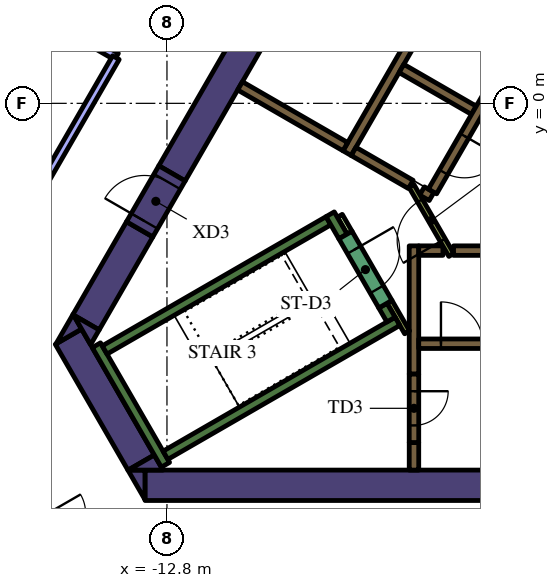
"""IFC4 building model, lengths in metres.
Left out: names, types, materials, properties, quantities, classifications, styles, units other than length and angle.
Written with IfcOpenShell. Run it as: python <this file> out.ifc"""

import sys

from ifc_helpers import new_model, si_unit, direction, frame, frame_2d, origin, place, context, subcontext, project, spatial, polyline, rectangle, outline, extrude, element, fill, save


model = new_model("IFC4")
c1 = context("Model", 3, precision=1e-05, world=origin(), true_north=direction((0.0, 1.0)))
c2 = subcontext(c1, "Body", "Model", "MODEL_VIEW")
j1 = project(units=[si_unit("LENGTHUNIT", "METRE"), si_unit("PLANEANGLEUNIT", "RADIAN")], contexts=[c1])
p1 = place(None, origin())
s1 = spatial("IfcSite", under=j1, at=p1, CompositionType="ELEMENT")
p2 = place(p1, origin())
s2 = spatial("IfcBuilding", under=s1, at=p2, CompositionType="ELEMENT")
p3 = place(p2, frame((0.0, 0.0, 192.0)))
s3 = spatial("IfcBuildingStorey", under=s2, at=p3, CompositionType="ELEMENT", Elevation=192.0)
p4 = place(p3, frame((-13.378, -10.05, 0.0), z_axis=(0.0, 0.0, 1.0), x_axis=(1.0, 0.0, 0.0)))
e1 = element("IfcWall", 1, at=p4, inside=s3, PredefinedType="SOLIDWALL", context=c2, shape_type="SweptSolid", body=[
    extrude(rectangle(XDim=22.282, YDim=0.8, at=frame_2d((11.141, 0.0))), origin(), (0.0, 0.0, 1.0), 4.2),
])
p5 = place(p3, origin())
e2 = element("IfcWall", 2, at=p5, inside=s3, PredefinedType="SOLIDWALL", context=c2, shape_type="SweptSolid", body=[
    extrude(outline(polyline([(-13.828, -9.65), (-13.38, -9.65), (-13.38, -10.426), (-13.828, -9.65)])), origin(), (0.0, 0.0, 1.0), 4.2),
])
p6 = place(p3, frame((-15.392, -6.14, 0.0), z_axis=(0.0, 0.0, 1.0), x_axis=(0.499984020225, -0.866034629516, 0.0)))
e3 = element("IfcWall", 3, at=p6, inside=s3, PredefinedType="SOLIDWALL", context=c2, shape_type="SweptSolid", body=[
    extrude(rectangle(XDim=3.824, YDim=0.8, at=frame_2d((1.912, 0.0))), origin(), (0.0, 0.0, 1.0), 4.2),
])
e4 = element("IfcWall", 4, at=p5, inside=s3, PredefinedType="SOLIDWALL", context=c2, shape_type="SweptSolid", body=[
    extrude(outline(polyline([(-15.047, -5.938), (-15.719, -6.326), (-15.271, -5.55), (-15.047, -5.938)])), origin(), (0.0, 0.0, 1.0), 4.2),
])
e5 = element("IfcWall", 5, at=p5, inside=s3, PredefinedType="SOLIDWALL", context=c2, shape_type="SweptSolid", body=[
    extrude(outline(polyline([(-12.904, -9.65), (-13.82, -9.65), (-13.133, -9.253), (-12.904, -9.65)])), origin(), (0.0, 0.0, 1.0), 4.2),
])
p7 = place(p3, frame((-13.518, -3.314, 0.0), z_axis=(0.0, 0.0, 1.0), x_axis=(-0.499969377405, -0.866043083026, 0.0)))
e6 = element("IfcWall", 6, at=p7, inside=s3, PredefinedType="SOLIDWALL", context=c2, shape_type="SweptSolid", body=[
    extrude(rectangle(XDim=2.824, YDim=0.8, at=frame_2d((1.412, 0.0))), origin(), (0.0, 0.0, 1.0), 4.2),
])
e7 = element("IfcWall", 7, at=p5, inside=s3, PredefinedType="SOLIDWALL", context=c2, shape_type="SweptSolid", body=[
    extrude(outline(polyline([(-14.809, -6.35), (-15.257, -5.574), (-14.585, -5.962), (-14.809, -6.35)])), origin(), (0.0, 0.0, 1.0), 4.2),
])
p8 = place(p3, frame((-4.321, 12.616, 0.0), z_axis=(0.0, 0.0, 1.0), x_axis=(-0.500009809857, -0.866019739987, 0.0)))
e8 = element("IfcWall", 8, at=p8, inside=s3, PredefinedType="SOLIDWALL", context=c2, shape_type="SweptSolid", body=[
    extrude(rectangle(XDim=16.695, YDim=0.8, at=frame_2d((8.347, 0.0))), origin(), (0.0, 0.0, 1.0), 4.2),
])
p9 = place(p3, frame((-12.84, -9.511, 0.0), z_axis=(0.0, 0.0, 1.0), x_axis=(-0.499997733992, 0.866026712061, 0.0)))
e9 = element("IfcWall", 9, at=p9, inside=s3, PredefinedType="SOLIDWALL", context=c2, shape_type="SweptSolid", body=[
    extrude(rectangle(XDim=3.634, YDim=0.25, at=frame_2d((1.817, 0.0))), origin(), (0.0, 0.0, 1.0), 4.2),
])
p10 = place(p3, frame((-14.44, -6.49, 0.0), z_axis=(0.0, 0.0, 1.0), x_axis=(0.866022966069, 0.500004222222, 0.0)))
e10 = element("IfcWall", 10, at=p10, inside=s3, PredefinedType="SOLIDWALL", context=c2, shape_type="SweptSolid", body=[
    extrude(rectangle(XDim=6.8, YDim=0.25, at=frame_2d((3.4, 0.0))), origin(), (0.0, 0.0, 1.0), 4.2),
])
p11 = place(p3, frame((-8.168, -3.503, 0.0), z_axis=(0.0, 0.0, 1.0), x_axis=(-0.499952099219, 0.866053057547, 0.0)))
e11 = element("IfcWall", 11, at=p11, inside=s3, PredefinedType="SOLIDWALL", context=c2, shape_type="SweptSolid", body=[
    extrude(rectangle(XDim=0.675, YDim=0.25, at=frame_2d((0.337, 0.0))), origin(), (0.0, 0.0, 1.0), 4.2),
])
p12 = place(p3, frame((-12.84, -9.261, 0.0), z_axis=(0.0, 0.0, 1.0), x_axis=(0.866016039709, 0.500016218704, 0.0)))
e12 = element("IfcWall", 12, at=p12, inside=s3, PredefinedType="SOLIDWALL", context=c2, shape_type="SweptSolid", body=[
    extrude(rectangle(XDim=7.05, YDim=0.25, at=frame_2d((3.525, 0.0))), origin(), (0.0, 0.0, 1.0), 4.2),
])
p13 = place(p3, frame((-6.905, -5.69, 0.0), z_axis=(0.0, 0.0, 1.0), x_axis=(-0.500402024738, 0.865793170242, 0.0)))
e13 = element("IfcWall", 13, at=p13, inside=s3, PredefinedType="SOLIDWALL", context=c2, shape_type="SweptSolid", body=[
    extrude(rectangle(XDim=0.425, YDim=0.25, at=frame_2d((0.212, 0.0))), origin(), (0.0, 0.0, 1.0), 4.2),
])
p14 = place(p3, frame((-6.3, -8.925, 0.0), z_axis=(0.0, 0.0, 1.0), x_axis=(0.0, -1.0, 0.0)))
e14 = element("IfcWall", 14, at=p14, inside=s3, PredefinedType="SOLIDWALL", context=c2, shape_type="SweptSolid", body=[
    extrude(rectangle(XDim=0.725, YDim=0.25, at=frame_2d((0.363, 0.0))), origin(), (0.0, 0.0, 1.0), 4.2),
])
p15 = place(p3, frame((-5.259, -3.875, 0.0), z_axis=(0.0, 0.0, 1.0), x_axis=(1.0, 0.0, 0.0)))
e15 = element("IfcWall", 15, at=p15, inside=s3, PredefinedType="SOLIDWALL", context=c2, shape_type="SweptSolid", body=[
    extrude(rectangle(XDim=10.489, YDim=0.25, at=frame_2d((5.244, 0.0))), origin(), (0.0, 0.0, 1.0), 4.2),
])
p16 = place(p3, frame((-6.3, -7.125, 0.0), z_axis=(0.0, 0.0, 1.0), x_axis=(0.0, 1.0, 0.0)))
e16 = element("IfcWall", 16, at=p16, inside=s3, PredefinedType="SOLIDWALL", context=c2, shape_type="SweptSolid", body=[
    extrude(rectangle(XDim=3.375, YDim=0.25, at=frame_2d((1.687, 0.0))), origin(), (0.0, 0.0, 1.0), 4.2),
])
p17 = place(p3, frame((-6.175, -3.875, 0.0), z_axis=(0.0, 0.0, 1.0), x_axis=(1.0, 0.0, 0.0)))
e17 = element("IfcWall", 17, at=p17, inside=s3, PredefinedType="SOLIDWALL", context=c2, shape_type="SweptSolid", body=[
    extrude(rectangle(XDim=0.637, YDim=0.25, at=frame_2d((0.318, 0.0))), origin(), (0.0, 0.0, 1.0), 4.2),
])
p18 = place(p3, frame((-3.02, 7.419, 0.0), z_axis=(0.0, 0.0, 1.0), x_axis=(-0.500022956343, -0.866012149528, 0.0)))
e18 = element("IfcWall", 18, at=p18, inside=s3, PredefinedType="SOLIDWALL", context=c2, shape_type="SweptSolid", body=[
    extrude(rectangle(XDim=10.08, YDim=0.25, at=frame_2d((5.04, 0.0))), origin(), (0.0, 0.0, 1.0), 4.2),
])
p19 = place(p3, frame((-4.724, -0.182, 0.0), z_axis=(0.0, 0.0, 1.0), x_axis=(-0.866008176907, 0.50002983664, 0.0)))
e19 = element("IfcWall", 19, at=p19, inside=s3, PredefinedType="SOLIDWALL", context=c2, shape_type="SweptSolid", body=[
    extrude(rectangle(XDim=2.2, YDim=0.25, at=frame_2d((1.1, 0.0))), origin(), (0.0, 0.0, 1.0), 4.2),
])
p20 = place(p3, frame((-6.088, -2.305, 0.0), z_axis=(0.0, 0.0, 1.0), x_axis=(0.866059450854, -0.499941024108, 0.0)))
e20 = element("IfcWall", 20, at=p20, inside=s3, PredefinedType="SOLIDWALL", context=c2, shape_type="SweptSolid", body=[
    extrude(rectangle(XDim=0.29, YDim=0.25, at=frame_2d((0.145, 0.0))), origin(), (0.0, 0.0, 1.0), 4.2),
])
p21 = place(p3, frame((-7.889, -1.265, 0.0), z_axis=(0.0, 0.0, 1.0), x_axis=(0.865986741702, -0.500066958712, 0.0)))
e21 = element("IfcWall", 21, at=p21, inside=s3, PredefinedType="SOLIDWALL", context=c2, shape_type="SweptSolid", body=[
    extrude(rectangle(XDim=1.738, YDim=0.25, at=frame_2d((0.869, 0.0))), origin(), (0.0, 0.0, 1.0), 4.2),
])
p22 = place(p3, frame((-8.106, -1.14, 0.0), z_axis=(0.0, 0.0, 1.0), x_axis=(-0.866008981251, 0.500028443584, 0.0)))
e22 = element("IfcWall", 22, at=p22, inside=s3, PredefinedType="SOLIDWALL", context=c2, shape_type="SweptSolid", body=[
    extrude(rectangle(XDim=3.2, YDim=0.25, at=frame_2d((1.6, 0.0))), origin(), (0.0, 0.0, 1.0), 4.2),
])
p23 = place(p3, frame((-8.252, -2.958, 0.0), z_axis=(0.0, 0.0, 1.0), x_axis=(0.500174715838, -0.865924508047, 0.0)))
e23 = element("IfcWall", 23, at=p23, inside=s3, PredefinedType="PARTITIONING", context=c2, shape_type="SweptSolid", body=[
    extrude(rectangle(XDim=0.514, YDim=0.15, at=frame_2d((0.257, 0.0))), origin(), (0.0, 0.0, 1.0), 3.1),
])
p24 = place(p3, frame((-6.48, -6.027, 0.0), z_axis=(0.0, 0.0, 1.0), x_axis=(-0.499927229454, 0.866067413802, 0.0)))
e24 = element("IfcWall", 24, at=p24, inside=s3, PredefinedType="PARTITIONING", context=c2, shape_type="SweptSolid", body=[
    extrude(rectangle(XDim=0.929, YDim=0.15, at=frame_2d((0.464, 0.0))), origin(), (0.0, 0.0, 1.0), 4.2),
])
p25 = place(p3, frame((-6.175, -6.325, 0.0), z_axis=(0.0, 0.0, 1.0), x_axis=(1.0, 0.0, 0.0)))
e25 = element("IfcWall", 25, at=p25, inside=s3, PredefinedType="SOLIDWALL", context=c2, shape_type="SweptSolid", body=[
    extrude(rectangle(XDim=12.35, YDim=0.25, at=frame_2d((6.175, 0.0))), origin(), (0.0, 0.0, 1.0), 4.2),
])
p26 = place(p25, frame((0.585, 0.0, 0.0)))
e26 = element("IfcOpeningElement", 26, at=p26, cuts=e25, PredefinedType="OPENING", context=c2, shape_type="SweptSolid", body=[
    extrude(rectangle(XDim=1.1, YDim=2.1, at=frame_2d((0.55, 1.05))), frame((0.0, 0.135, 0.0), z_axis=(0.0, -1.0, 0.0), x_axis=(1.0, 0.0, 0.0)), (0.0, 0.0, 1.0), 0.27),
])
p27 = place(p25, frame((3.105, 0.0, 0.0)))
e27 = element("IfcOpeningElement", 27, at=p27, cuts=e25, PredefinedType="OPENING", context=c2, shape_type="SweptSolid", body=[
    extrude(rectangle(XDim=1.1, YDim=2.1, at=frame_2d((0.55, 1.05))), frame((0.0, 0.135, 0.0), z_axis=(0.0, -1.0, 0.0), x_axis=(1.0, 0.0, 0.0)), (0.0, 0.0, 1.0), 0.27),
])
p28 = place(p25, frame((5.625, 0.0, 0.0)))
e28 = element("IfcOpeningElement", 28, at=p28, cuts=e25, PredefinedType="OPENING", context=c2, shape_type="SweptSolid", body=[
    extrude(rectangle(XDim=1.1, YDim=2.1, at=frame_2d((0.55, 1.05))), frame((0.0, 0.135, 0.0), z_axis=(0.0, -1.0, 0.0), x_axis=(1.0, 0.0, 0.0)), (0.0, 0.0, 1.0), 0.27),
])
p29 = place(p25, frame((8.145, 0.0, 0.0)))
e29 = element("IfcOpeningElement", 29, at=p29, cuts=e25, PredefinedType="OPENING", context=c2, shape_type="SweptSolid", body=[
    extrude(rectangle(XDim=1.1, YDim=2.1, at=frame_2d((0.55, 1.05))), frame((0.0, 0.135, 0.0), z_axis=(0.0, -1.0, 0.0), x_axis=(1.0, 0.0, 0.0)), (0.0, 0.0, 1.0), 0.27),
])
p30 = place(p25, frame((10.665, 0.0, 0.0)))
e30 = element("IfcOpeningElement", 30, at=p30, cuts=e25, PredefinedType="OPENING", context=c2, shape_type="SweptSolid", body=[
    extrude(rectangle(XDim=1.1, YDim=2.1, at=frame_2d((0.55, 1.05))), frame((0.0, 0.135, 0.0), z_axis=(0.0, -1.0, 0.0), x_axis=(1.0, 0.0, 0.0)), (0.0, 0.0, 1.0), 0.27),
])
p31 = place(p3, frame((-0.898, 6.194, 0.0), z_axis=(0.0, 0.0, 1.0), x_axis=(-0.499996202215, -0.866027596426, 0.0)))
e31 = element("IfcWall", 31, at=p31, inside=s3, PredefinedType="SOLIDWALL", context=c2, shape_type="SweptSolid", body=[
    extrude(rectangle(XDim=9.83, YDim=0.25, at=frame_2d((4.915, 0.0))), origin(), (0.0, 0.0, 1.0), 4.2),
])
p32 = place(p31, frame((0.585, 0.0, 0.0)))
e32 = element("IfcOpeningElement", 32, at=p32, cuts=e31, PredefinedType="OPENING", context=c2, shape_type="SweptSolid", body=[
    extrude(rectangle(XDim=1.1, YDim=2.1, at=frame_2d((0.55, 1.05))), frame((0.0, 0.135, 0.0), z_axis=(0.0, -1.0, 0.0), x_axis=(1.0, 0.0, 0.0)), (0.0, 0.0, 1.0), 0.27),
])
p33 = place(p31, frame((3.105, 0.0, 0.0)))
e33 = element("IfcOpeningElement", 33, at=p33, cuts=e31, PredefinedType="OPENING", context=c2, shape_type="SweptSolid", body=[
    extrude(rectangle(XDim=1.1, YDim=2.1, at=frame_2d((0.55, 1.05))), frame((0.0, 0.135, 0.0), z_axis=(0.0, -1.0, 0.0), x_axis=(1.0, 0.0, 0.0)), (0.0, 0.0, 1.0), 0.27),
])
p34 = place(p31, frame((5.625, 0.0, 0.0)))
e34 = element("IfcOpeningElement", 34, at=p34, cuts=e31, PredefinedType="OPENING", context=c2, shape_type="SweptSolid", body=[
    extrude(rectangle(XDim=1.1, YDim=2.1, at=frame_2d((0.55, 1.05))), frame((0.0, 0.135, 0.0), z_axis=(0.0, -1.0, 0.0), x_axis=(1.0, 0.0, 0.0)), (0.0, 0.0, 1.0), 0.27),
])
p35 = place(p31, frame((8.145, 0.0, 0.0)))
e35 = element("IfcOpeningElement", 35, at=p35, cuts=e31, PredefinedType="OPENING", context=c2, shape_type="SweptSolid", body=[
    extrude(rectangle(XDim=1.1, YDim=2.1, at=frame_2d((0.55, 1.05))), frame((0.0, 0.135, 0.0), z_axis=(0.0, -1.0, 0.0), x_axis=(1.0, 0.0, 0.0)), (0.0, 0.0, 1.0), 0.27),
])
p36 = place(p3, frame((-8.103, -3.466, 0.0), z_axis=(0.0, 0.0, 1.0), x_axis=(0.500078061341, -0.865980330357, 0.0)))
e36 = element("IfcWall", 36, at=p36, inside=s3, PredefinedType="SOLIDWALL", context=c2, shape_type="SweptSolid", body=[
    extrude(rectangle(XDim=2.1, YDim=0.4, at=frame_2d((1.05, 0.0))), origin(), (0.0, 0.0, 1.0), 4.2),
])
p37 = place(p36, frame((0.45, 0.0, 0.0)))
e37 = element("IfcOpeningElement", 37, at=p37, cuts=e36, PredefinedType="OPENING", context=c2, shape_type="SweptSolid", body=[
    extrude(rectangle(XDim=1.2, YDim=2.1, at=frame_2d((0.6, 1.05))), frame((0.0, 0.21, 0.0), z_axis=(0.0, -1.0, 0.0), x_axis=(1.0, 0.0, 0.0)), (0.0, 0.0, 1.0), 0.42),
])
p38 = place(p3, frame((-6.3, -7.125, 0.0), z_axis=(0.0, 0.0, 1.0), x_axis=(0.0, -1.0, 0.0)))
e38 = element("IfcWall", 38, at=p38, inside=s3, PredefinedType="SOLIDWALL", context=c2, shape_type="SweptSolid", body=[
    extrude(rectangle(XDim=1.8, YDim=0.25, at=frame_2d((0.9, 0.0))), origin(), (0.0, 0.0, 1.0), 4.2),
])
p39 = place(p38, frame((0.45, 0.0, 0.0)))
e39 = element("IfcOpeningElement", 39, at=p39, cuts=e38, PredefinedType="OPENING", context=c2, shape_type="SweptSolid", body=[
    extrude(rectangle(XDim=0.9, YDim=2.1, at=frame_2d((0.45, 1.05))), frame((0.0, 0.135, 0.0), z_axis=(0.0, -1.0, 0.0), x_axis=(1.0, 0.0, 0.0)), (0.0, 0.0, 1.0), 0.27),
])
p40 = place(p3, frame((-5.317, -3.99, 0.0), z_axis=(0.0, 0.0, 1.0), x_axis=(-0.500027713859, 0.866009402589, 0.0)))
e40 = element("IfcWall", 40, at=p40, inside=s3, PredefinedType="PARTITIONING", context=c2, shape_type="SweptSolid", body=[
    extrude(rectangle(XDim=2.1, YDim=0.15, at=frame_2d((1.05, 0.0))), origin(), (0.0, 0.0, 1.0), 4.2),
])
p41 = place(p40, frame((0.45, 0.0, 0.0)))
e41 = element("IfcOpeningElement", 41, at=p41, cuts=e40, PredefinedType="OPENING", context=c2, shape_type="SweptSolid", body=[
    extrude(rectangle(XDim=1.2, YDim=2.1, at=frame_2d((0.6, 1.05))), frame((0.0, 0.085, 0.0), z_axis=(0.0, -1.0, 0.0), x_axis=(1.0, 0.0, 0.0)), (0.0, 0.0, 1.0), 0.17),
])
p42 = place(p3, frame((-13.518, -3.314, 0.0), z_axis=(0.0, 0.0, 1.0), x_axis=(0.500000056704, 0.866025371046, 0.0)))
e42 = element("IfcWall", 42, at=p42, inside=s3, PredefinedType="SOLIDWALL", context=c2, shape_type="SweptSolid", body=[
    extrude(rectangle(XDim=1.7, YDim=0.8, at=frame_2d((0.85, 0.0))), origin(), (0.0, 0.0, 1.0), 4.2),
])
p43 = place(p42, frame((0.25, 0.0, 0.0)))
e43 = element("IfcOpeningElement", 43, at=p43, cuts=e42, PredefinedType="OPENING", context=c2, shape_type="SweptSolid", body=[
    extrude(rectangle(XDim=1.2, YDim=2.1, at=frame_2d((0.6, 1.05))), frame((0.0, 0.41, 0.0), z_axis=(0.0, -1.0, 0.0), x_axis=(1.0, 0.0, 0.0)), (0.0, 0.0, 1.0), 0.82),
])
p44 = place(p3, frame((-16.59, -9.665, 0.0), z_axis=(0.0, 0.0, 1.0), x_axis=(0.499994443168, -0.866028611999, 0.0)))
e44 = element("IfcWall", 44, at=p44, inside=s3, PredefinedType="PARTITIONING", context=c2, shape_type="SweptSolid", body=[
    extrude(rectangle(XDim=3.678, YDim=0.2, at=frame_2d((1.839, 0.0))), origin(), (0.0, 0.0, 1.0), 3.1),
])
p45 = place(p44, frame((1.3, 0.0, 0.0)))
e45 = element("IfcOpeningElement", 45, at=p45, cuts=e44, PredefinedType="OPENING", context=c2, shape_type="SweptSolid", body=[
    extrude(rectangle(XDim=1.0, YDim=2.1, at=frame_2d((0.5, 1.05))), frame((0.0, 0.11, 0.0), z_axis=(0.0, -1.0, 0.0), x_axis=(1.0, 0.0, 0.0)), (0.0, 0.0, 1.0), 0.22),
])
p46 = place(p3, frame((-18.251, -0.481, 0.0), z_axis=(0.0, 0.0, 1.0), x_axis=(0.472318506028, 0.881427948765, 0.0)))
e46 = element("IfcWall", 46, at=p46, inside=s3, PredefinedType="PARTITIONING", context=c2, shape_type="SweptSolid", body=[
    extrude(rectangle(XDim=6.419, YDim=0.15, at=frame_2d((3.21, 0.0))), origin(), (0.0, 0.0, 1.0), 3.1),
])
p47 = place(p46, frame((2.719, 0.0, 0.0)))
e47 = element("IfcOpeningElement", 47, at=p47, cuts=e46, PredefinedType="OPENING", context=c2, shape_type="SweptSolid", body=[
    extrude(rectangle(XDim=0.9, YDim=2.1, at=frame_2d((0.45, 1.05))), frame((0.0, 0.085, 0.0), z_axis=(0.0, -1.0, 0.0), x_axis=(1.0, 0.0, 0.0)), (0.0, 0.0, 1.0), 0.17),
])
p48 = place(p3, frame((-15.488, 2.014, 0.0), z_axis=(0.0, 0.0, 1.0), x_axis=(0.865975818674, -0.500085874098, 0.0)))
e48 = element("IfcWall", 48, at=p48, inside=s3, PredefinedType="PARTITIONING", context=c2, shape_type="SweptSolid", body=[
    extrude(rectangle(XDim=1.57, YDim=0.2, at=frame_2d((0.785, 0.0))), origin(), (0.0, 0.0, 1.0), 3.1),
])
p49 = place(p3, frame((-14.143, 1.203, 0.0), z_axis=(0.0, 0.0, 1.0), x_axis=(-0.500010806419, -0.866019164606, 0.0)))
e49 = element("IfcWall", 49, at=p49, inside=s3, PredefinedType="PARTITIONING", context=c2, shape_type="SweptSolid", body=[
    extrude(rectangle(XDim=8.721, YDim=0.2, at=frame_2d((4.361, 0.0))), origin(), (0.0, 0.0, 1.0), 3.1),
])
p50 = place(p26, origin())
e50 = element("IfcDoor", 50, at=p50, inside=s3, OperationType="DOUBLE_DOOR_SLIDING", PredefinedType="DOOR", context=c2, shape_type="SweptSolid", body=[
    extrude(rectangle(XDim=1.1, YDim=2.1, at=frame_2d((0.55, 1.05))), frame((0.0, 0.025, 0.0), z_axis=(0.0, -1.0, 0.0), x_axis=(1.0, 0.0, 0.0)), (0.0, 0.0, 1.0), 0.05),
])
fill(e26, e50)
p51 = place(p35, origin())
e51 = element("IfcDoor", 51, at=p51, inside=s3, OperationType="DOUBLE_DOOR_SLIDING", PredefinedType="DOOR", context=c2, shape_type="SweptSolid", body=[
    extrude(rectangle(XDim=1.1, YDim=2.1, at=frame_2d((0.55, 1.05))), frame((0.0, 0.025, 0.0), z_axis=(0.0, -1.0, 0.0), x_axis=(1.0, 0.0, 0.0)), (0.0, 0.0, 1.0), 0.05),
])
fill(e35, e51)
p52 = place(p37, origin())
e52 = element("IfcDoor", 52, at=p52, inside=s3, OperationType="SINGLE_SWING_LEFT", PredefinedType="DOOR", context=c2, shape_type="SweptSolid", body=[
    extrude(rectangle(XDim=1.2, YDim=2.1, at=frame_2d((0.6, 1.05))), frame((0.0, 0.025, 0.0), z_axis=(0.0, -1.0, 0.0), x_axis=(1.0, 0.0, 0.0)), (0.0, 0.0, 1.0), 0.05),
])
fill(e37, e52)
p53 = place(p39, origin())
e53 = element("IfcDoor", 53, at=p53, inside=s3, OperationType="SINGLE_SWING_LEFT", PredefinedType="DOOR", context=c2, shape_type="SweptSolid", body=[
    extrude(rectangle(XDim=0.9, YDim=2.1, at=frame_2d((0.45, 1.05))), frame((0.0, 0.025, 0.0), z_axis=(0.0, -1.0, 0.0), x_axis=(1.0, 0.0, 0.0)), (0.0, 0.0, 1.0), 0.05),
])
fill(e39, e53)
p54 = place(p41, origin())
e54 = element("IfcDoor", 54, at=p54, inside=s3, OperationType="SINGLE_SWING_LEFT", PredefinedType="DOOR", context=c2, shape_type="SweptSolid", body=[
    extrude(rectangle(XDim=1.2, YDim=2.1, at=frame_2d((0.6, 1.05))), frame((0.0, 0.025, 0.0), z_axis=(0.0, -1.0, 0.0), x_axis=(1.0, 0.0, 0.0)), (0.0, 0.0, 1.0), 0.05),
])
fill(e41, e54)
p55 = place(p43, origin())
e55 = element("IfcDoor", 55, at=p55, inside=s3, OperationType="SINGLE_SWING_LEFT", PredefinedType="DOOR", context=c2, shape_type="SweptSolid", body=[
    extrude(rectangle(XDim=1.2, YDim=2.1, at=frame_2d((0.6, 1.05))), frame((0.0, 0.025, 0.0), z_axis=(0.0, -1.0, 0.0), x_axis=(1.0, 0.0, 0.0)), (0.0, 0.0, 1.0), 0.05),
])
fill(e43, e55)
save(model, sys.argv[1])
